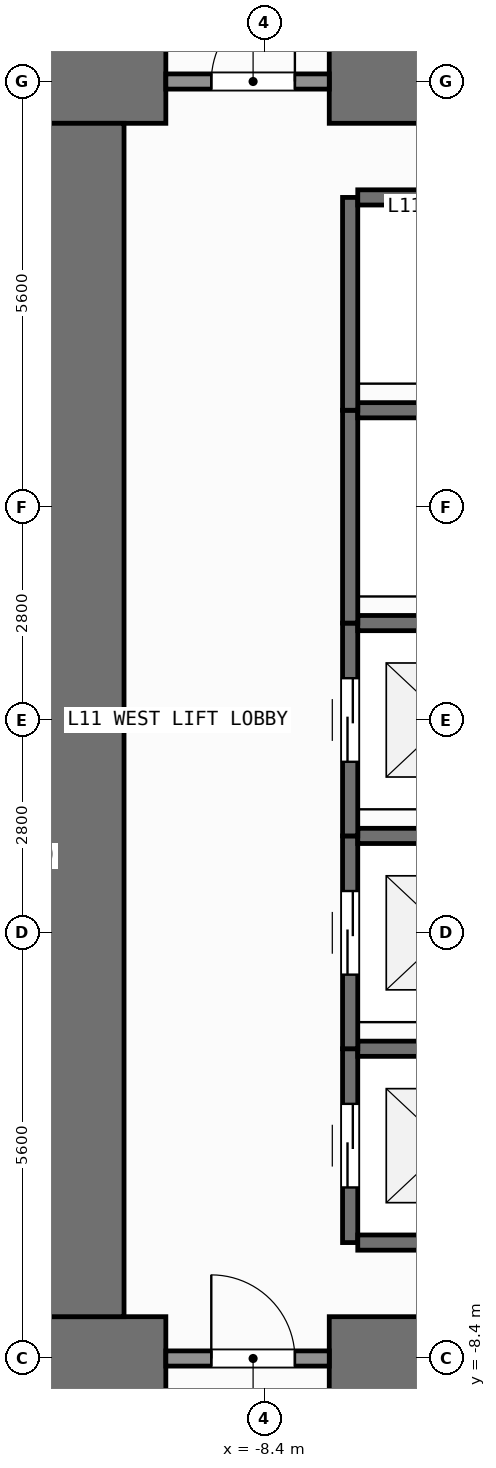
"""IFC4 building model, lengths in metres.
Left out: names, types, materials, properties, quantities, classifications, styles, units other than length and angle.
Written with IfcOpenShell. Run it as: python <this file> out.ifc"""

import sys

from ifc_helpers import new_model, si_unit, direction, frame, frame_2d, origin, place, context, subcontext, project, spatial, rectangle, extrude, element, fill, save


model = new_model("IFC4")
c1 = context("Model", 3, precision=1e-05, world=origin(), true_north=direction((0.0, 1.0)))
c2 = subcontext(c1, "Body", "Model", "MODEL_VIEW")
j1 = project(units=[si_unit("LENGTHUNIT", "METRE"), si_unit("PLANEANGLEUNIT", "RADIAN")], contexts=[c1])
p1 = place(None, origin())
s1 = spatial("IfcSite", under=j1, at=p1, CompositionType="ELEMENT")
p2 = place(p1, origin())
s2 = spatial("IfcBuilding", under=s1, at=p2, CompositionType="ELEMENT")
p3 = place(p2, frame((0.0, 0.0, 42.3)))
s3 = spatial("IfcBuildingStorey", under=s2, at=p3, CompositionType="ELEMENT", Elevation=42.3)
p4 = place(p3, frame((-11.35, -8.4, 0.0), z_axis=(0.0, 0.0, 1.0), x_axis=(1.0, 0.0, 0.0)))
e1 = element("IfcWall", 1, at=p4, inside=s3, PredefinedType="SHEAR", context=c2, shape_type="SweptSolid", body=[
    extrude(rectangle(XDim=1.65, YDim=1.1, at=frame_2d((0.825, 0.0))), origin(), (0.0, 0.0, 1.0), 3.9),
])
p5 = place(p3, frame((-7.55, -8.4, 0.0), z_axis=(0.0, 0.0, 1.0), x_axis=(1.0, 0.0, 0.0)))
e2 = element("IfcWall", 2, at=p5, inside=s3, PredefinedType="SHEAR", context=c2, shape_type="SweptSolid", body=[
    extrude(rectangle(XDim=3.35, YDim=1.1, at=frame_2d((1.675, 0.0))), origin(), (0.0, 0.0, 1.0), 3.9),
])
p6 = place(p3, frame((-11.35, 8.4, 0.0), z_axis=(0.0, 0.0, 1.0), x_axis=(1.0, 0.0, 0.0)))
e3 = element("IfcWall", 3, at=p6, inside=s3, PredefinedType="SHEAR", context=c2, shape_type="SweptSolid", body=[
    extrude(rectangle(XDim=1.65, YDim=1.1, at=frame_2d((0.825, 0.0))), origin(), (0.0, 0.0, 1.0), 3.9),
])
p7 = place(p3, frame((-7.55, 8.4, 0.0), z_axis=(0.0, 0.0, 1.0), x_axis=(1.0, 0.0, 0.0)))
e4 = element("IfcWall", 4, at=p7, inside=s3, PredefinedType="SHEAR", context=c2, shape_type="SweptSolid", body=[
    extrude(rectangle(XDim=16.5, YDim=1.1, at=frame_2d((8.25, 0.0))), origin(), (0.0, 0.0, 1.0), 3.9),
])
p8 = place(p3, frame((-10.8, -7.85, 0.0), z_axis=(0.0, 0.0, 1.0), x_axis=(0.0, 1.0, 0.0)))
e5 = element("IfcWall", 5, at=p8, inside=s3, PredefinedType="SHEAR", context=c2, shape_type="SweptSolid", body=[
    extrude(rectangle(XDim=15.7, YDim=1.1, at=frame_2d((7.85, 0.0))), origin(), (0.0, 0.0, 1.0), 3.9),
])
p9 = place(p3, frame((-7.275, -6.875, 0.0), z_axis=(0.0, 0.0, 1.0), x_axis=(0.0, 1.0, 0.0)))
e6 = element("IfcWall", 6, at=p9, inside=s3, PredefinedType="SHEAR", context=c2, shape_type="SweptSolid", body=[
    extrude(rectangle(XDim=2.55, YDim=0.2, at=frame_2d((1.275, 0.0))), origin(), (0.0, 0.0, 1.0), 3.68),
])
p10 = place(p9, frame((0.725, 0.0, 0.0)))
e7 = element("IfcOpeningElement", 7, at=p10, cuts=e6, PredefinedType="OPENING", context=c2, shape_type="SweptSolid", body=[
    extrude(rectangle(XDim=1.1, YDim=2.2, at=frame_2d((0.55, 1.1))), frame((0.0, 0.11, 0.0), z_axis=(0.0, -1.0, 0.0), x_axis=(1.0, 0.0, 0.0)), (0.0, 0.0, 1.0), 0.22),
])
for number, where, z_axis, x_axis in (
    (8, (-7.175, -6.875, 0.0), (0.0, 0.0, 1.0), (1.0, 0.0, 0.0)),
    (9, (-7.175, -4.325, 0.0), (0.0, 0.0, 1.0), (1.0, 0.0, 0.0)),
):
    element("IfcWall", number, at=place(p3, frame(where, z_axis=z_axis, x_axis=x_axis)), inside=s3, PredefinedType="SHEAR", context=c2, shape_type="SweptSolid", body=[
        extrude(rectangle(XDim=2.35, YDim=0.2, at=frame_2d((1.175, 0.0))), origin(), (0.0, 0.0, 1.0), 3.68),
    ])
p11 = place(p3, frame((-7.275, -4.325, 0.0), z_axis=(0.0, 0.0, 1.0), x_axis=(0.0, 1.0, 0.0)))
e10 = element("IfcWall", 10, at=p11, inside=s3, PredefinedType="SHEAR", context=c2, shape_type="SweptSolid", body=[
    extrude(rectangle(XDim=2.8, YDim=0.2, at=frame_2d((1.4, 0.0))), origin(), (0.0, 0.0, 1.0), 3.68),
])
p12 = place(p11, frame((0.975, 0.0, 0.0)))
e11 = element("IfcOpeningElement", 11, at=p12, cuts=e10, PredefinedType="OPENING", context=c2, shape_type="SweptSolid", body=[
    extrude(rectangle(XDim=1.1, YDim=2.2, at=frame_2d((0.55, 1.1))), frame((0.0, 0.11, 0.0), z_axis=(0.0, -1.0, 0.0), x_axis=(1.0, 0.0, 0.0)), (0.0, 0.0, 1.0), 0.22),
])
p13 = place(p3, frame((-7.175, -1.525, 0.0), z_axis=(0.0, 0.0, 1.0), x_axis=(1.0, 0.0, 0.0)))
e12 = element("IfcWall", 12, at=p13, inside=s3, PredefinedType="SHEAR", context=c2, shape_type="SweptSolid", body=[
    extrude(rectangle(XDim=2.35, YDim=0.2, at=frame_2d((1.175, 0.0))), origin(), (0.0, 0.0, 1.0), 3.68),
])
p14 = place(p3, frame((-7.275, -1.525, 0.0), z_axis=(0.0, 0.0, 1.0), x_axis=(0.0, 1.0, 0.0)))
e13 = element("IfcWall", 13, at=p14, inside=s3, PredefinedType="SHEAR", context=c2, shape_type="SweptSolid", body=[
    extrude(rectangle(XDim=2.8, YDim=0.2, at=frame_2d((1.4, 0.0))), origin(), (0.0, 0.0, 1.0), 3.68),
])
p15 = place(p14, frame((0.975, 0.0, 0.0)))
e14 = element("IfcOpeningElement", 14, at=p15, cuts=e13, PredefinedType="OPENING", context=c2, shape_type="SweptSolid", body=[
    extrude(rectangle(XDim=1.1, YDim=2.2, at=frame_2d((0.55, 1.1))), frame((0.0, 0.11, 0.0), z_axis=(0.0, -1.0, 0.0), x_axis=(1.0, 0.0, 0.0)), (0.0, 0.0, 1.0), 0.22),
])
p16 = place(p3, frame((-7.175, 1.275, 0.0), z_axis=(0.0, 0.0, 1.0), x_axis=(1.0, 0.0, 0.0)))
e15 = element("IfcWall", 15, at=p16, inside=s3, PredefinedType="SHEAR", context=c2, shape_type="SweptSolid", body=[
    extrude(rectangle(XDim=2.35, YDim=0.2, at=frame_2d((1.175, 0.0))), origin(), (0.0, 0.0, 1.0), 3.68),
])
p17 = place(p3, frame((-7.275, 1.275, 0.0), z_axis=(0.0, 0.0, 1.0), x_axis=(0.0, 1.0, 0.0)))
e16 = element("IfcWall", 16, at=p17, inside=s3, PredefinedType="SHEAR", context=c2, shape_type="SweptSolid", body=[
    extrude(rectangle(XDim=2.8, YDim=0.2, at=frame_2d((1.4, 0.0))), origin(), (0.0, 0.0, 1.0), 3.68),
])
p18 = place(p3, frame((-7.175, 4.075, 0.0), z_axis=(0.0, 0.0, 1.0), x_axis=(1.0, 0.0, 0.0)))
e17 = element("IfcWall", 17, at=p18, inside=s3, PredefinedType="SHEAR", context=c2, shape_type="SweptSolid", body=[
    extrude(rectangle(XDim=2.35, YDim=0.2, at=frame_2d((1.175, 0.0))), origin(), (0.0, 0.0, 1.0), 3.68),
])
p19 = place(p3, frame((-7.275, 4.075, 0.0), z_axis=(0.0, 0.0, 1.0), x_axis=(0.0, 1.0, 0.0)))
e18 = element("IfcWall", 18, at=p19, inside=s3, PredefinedType="SHEAR", context=c2, shape_type="SweptSolid", body=[
    extrude(rectangle(XDim=2.8, YDim=0.2, at=frame_2d((1.4, 0.0))), origin(), (0.0, 0.0, 1.0), 3.68),
])
p20 = place(p3, frame((-7.175, 6.875, 0.0), z_axis=(0.0, 0.0, 1.0), x_axis=(1.0, 0.0, 0.0)))
e19 = element("IfcWall", 19, at=p20, inside=s3, PredefinedType="SHEAR", context=c2, shape_type="SweptSolid", body=[
    extrude(rectangle(XDim=2.35, YDim=0.2, at=frame_2d((1.175, 0.0))), origin(), (0.0, 0.0, 1.0), 3.68),
])
p21 = place(p3, frame((-9.7, -8.4, 0.0), z_axis=(0.0, 0.0, 1.0), x_axis=(1.0, 0.0, 0.0)))
e20 = element("IfcWall", 20, at=p21, inside=s3, PredefinedType="SOLIDWALL", context=c2, shape_type="SweptSolid", body=[
    extrude(rectangle(XDim=2.15, YDim=0.2, at=frame_2d((1.075, 0.0))), origin(), (0.0, 0.0, 1.0), 2.72),
])
p22 = place(p21, frame((0.598, 0.0, 0.0)))
e21 = element("IfcOpeningElement", 21, at=p22, cuts=e20, PredefinedType="OPENING", context=c2, shape_type="SweptSolid", body=[
    extrude(rectangle(XDim=1.1, YDim=2.15, at=frame_2d((0.55, 1.075))), frame((0.0, 0.11, 0.0), z_axis=(0.0, -1.0, 0.0), x_axis=(1.0, 0.0, 0.0)), (0.0, 0.0, 1.0), 0.22),
])
p23 = place(p3, frame((-9.7, 8.4, 0.0), z_axis=(0.0, 0.0, 1.0), x_axis=(1.0, 0.0, 0.0)))
e22 = element("IfcWall", 22, at=p23, inside=s3, PredefinedType="SOLIDWALL", context=c2, shape_type="SweptSolid", body=[
    extrude(rectangle(XDim=2.15, YDim=0.2, at=frame_2d((1.075, 0.0))), origin(), (0.0, 0.0, 1.0), 2.72),
])
p24 = place(p23, frame((0.598, 0.0, 0.0)))
e23 = element("IfcOpeningElement", 23, at=p24, cuts=e22, PredefinedType="OPENING", context=c2, shape_type="SweptSolid", body=[
    extrude(rectangle(XDim=1.1, YDim=2.15, at=frame_2d((0.55, 1.075))), frame((0.0, 0.11, 0.0), z_axis=(0.0, -1.0, 0.0), x_axis=(1.0, 0.0, 0.0)), (0.0, 0.0, 1.0), 0.22),
])
p25 = place(p10, origin())
e24 = element("IfcDoor", 24, at=p25, inside=s3, OperationType="SLIDING_TO_LEFT", PredefinedType="DOOR", context=c2, shape_type="SweptSolid", body=[
    extrude(rectangle(XDim=1.1, YDim=2.2, at=frame_2d((0.55, 1.1))), frame((0.0, 0.025, 0.0), z_axis=(0.0, -1.0, 0.0), x_axis=(1.0, 0.0, 0.0)), (0.0, 0.0, 1.0), 0.05),
])
fill(e7, e24)
p26 = place(p12, origin())
e25 = element("IfcDoor", 25, at=p26, inside=s3, OperationType="SLIDING_TO_LEFT", PredefinedType="DOOR", context=c2, shape_type="SweptSolid", body=[
    extrude(rectangle(XDim=1.1, YDim=2.2, at=frame_2d((0.55, 1.1))), frame((0.0, 0.025, 0.0), z_axis=(0.0, -1.0, 0.0), x_axis=(1.0, 0.0, 0.0)), (0.0, 0.0, 1.0), 0.05),
])
fill(e11, e25)
p27 = place(p15, origin())
e26 = element("IfcDoor", 26, at=p27, inside=s3, OperationType="SLIDING_TO_LEFT", PredefinedType="DOOR", context=c2, shape_type="SweptSolid", body=[
    extrude(rectangle(XDim=1.1, YDim=2.2, at=frame_2d((0.55, 1.1))), frame((0.0, 0.025, 0.0), z_axis=(0.0, -1.0, 0.0), x_axis=(1.0, 0.0, 0.0)), (0.0, 0.0, 1.0), 0.05),
])
fill(e14, e26)
p28 = place(p22, origin())
e27 = element("IfcDoor", 27, at=p28, inside=s3, OperationType="SINGLE_SWING_LEFT", PredefinedType="DOOR", context=c2, shape_type="SweptSolid", body=[
    extrude(rectangle(XDim=1.1, YDim=2.15, at=frame_2d((0.55, 1.075))), frame((0.0, 0.025, 0.0), z_axis=(0.0, -1.0, 0.0), x_axis=(1.0, 0.0, 0.0)), (0.0, 0.0, 1.0), 0.05),
])
fill(e21, e27)
p29 = place(p24, origin())
e28 = element("IfcDoor", 28, at=p29, inside=s3, OperationType="SINGLE_SWING_RIGHT", PredefinedType="DOOR", context=c2, shape_type="SweptSolid", body=[
    extrude(rectangle(XDim=1.1, YDim=2.15, at=frame_2d((0.55, 1.075))), frame((0.0, 0.025, 0.0), z_axis=(0.0, -1.0, 0.0), x_axis=(1.0, 0.0, 0.0)), (0.0, 0.0, 1.0), 0.05),
])
fill(e23, e28)
save(model, sys.argv[1])
